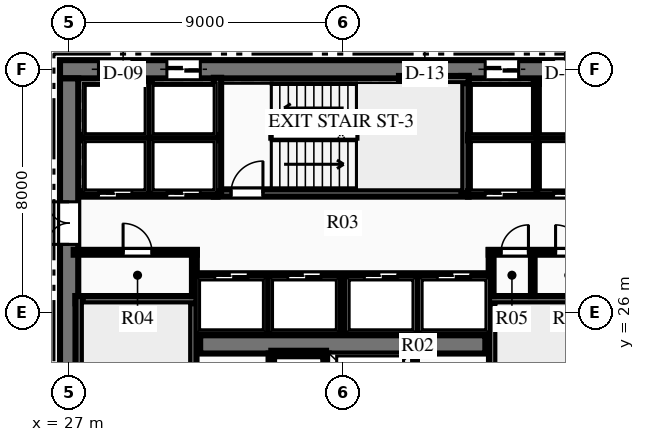
"""IFC4 building model, lengths in metres.
Left out: names, types, materials, properties, quantities, classifications, styles, units other than length and angle.
Written with IfcOpenShell. Run it as: python <this file> out.ifc"""

import sys

from ifc_helpers import new_model, si_unit, direction, frame, frame_2d, origin, place, context, subcontext, project, spatial, rectangle, extrude, element, fill, save


model = new_model("IFC4")
c1 = context("Model", 3, precision=1e-05, world=origin(), true_north=direction((0.0, 1.0)))
c2 = subcontext(c1, "Body", "Model", "MODEL_VIEW")
j1 = project(units=[si_unit("LENGTHUNIT", "METRE"), si_unit("PLANEANGLEUNIT", "RADIAN")], contexts=[c1])
p1 = place(None, origin())
s1 = spatial("IfcSite", under=j1, at=p1, CompositionType="ELEMENT")
p2 = place(p1, origin())
s2 = spatial("IfcBuilding", under=s1, at=p2, CompositionType="ELEMENT")
p3 = place(p2, frame((0.0, 0.0, 58.95)))
s3 = spatial("IfcBuildingStorey", under=s2, at=p3, CompositionType="ELEMENT", Elevation=58.95)
p4 = place(p3, frame((26.7, 34.0, 0.0), z_axis=(0.0, 0.0, 1.0), x_axis=(1.0, 0.0, 0.0)))
e1 = element("IfcWall", 1, at=p4, inside=s3, PredefinedType="SHEAR", context=c2, shape_type="SweptSolid", body=[
    extrude(rectangle(XDim=18.6, YDim=0.6, at=frame_2d((9.3, 0.0))), origin(), (0.0, 0.0, 1.0), 3.75),
])
p5 = place(p4, frame((1.265, 0.0, 0.0)))
e2 = element("IfcOpeningElement", 2, at=p5, cuts=e1, PredefinedType="OPENING", context=c2, shape_type="SweptSolid", body=[
    extrude(rectangle(XDim=1.1, YDim=2.15, at=frame_2d((0.55, 1.075))), frame((0.0, 0.31, 0.0), z_axis=(0.0, -1.0, 0.0), x_axis=(1.0, 0.0, 0.0)), (0.0, 0.0, 1.0), 0.62),
])
p6 = place(p4, frame((3.515, 0.0, 0.0)))
e3 = element("IfcOpeningElement", 3, at=p6, cuts=e1, PredefinedType="OPENING", context=c2, shape_type="SweptSolid", body=[
    extrude(rectangle(XDim=1.1, YDim=2.15, at=frame_2d((0.55, 1.075))), frame((0.0, 0.31, 0.0), z_axis=(0.0, -1.0, 0.0), x_axis=(1.0, 0.0, 0.0)), (0.0, 0.0, 1.0), 0.62),
])
p7 = place(p4, frame((13.985, 0.0, 0.0)))
e4 = element("IfcOpeningElement", 4, at=p7, cuts=e1, PredefinedType="OPENING", context=c2, shape_type="SweptSolid", body=[
    extrude(rectangle(XDim=1.1, YDim=2.15, at=frame_2d((0.55, 1.075))), frame((0.0, 0.31, 0.0), z_axis=(0.0, -1.0, 0.0), x_axis=(1.0, 0.0, 0.0)), (0.0, 0.0, 1.0), 0.62),
])
p8 = place(p4, frame((16.235, 0.0, 0.0)))
e5 = element("IfcOpeningElement", 5, at=p8, cuts=e1, PredefinedType="OPENING", context=c2, shape_type="SweptSolid", body=[
    extrude(rectangle(XDim=1.1, YDim=2.15, at=frame_2d((0.55, 1.075))), frame((0.0, 0.31, 0.0), z_axis=(0.0, -1.0, 0.0), x_axis=(1.0, 0.0, 0.0)), (0.0, 0.0, 1.0), 0.62),
])
p9 = place(p3, frame((27.0, 18.3, 0.0), z_axis=(0.0, 0.0, 1.0), x_axis=(0.0, 1.0, 0.0)))
e6 = element("IfcWall", 6, at=p9, inside=s3, PredefinedType="SHEAR", context=c2, shape_type="SweptSolid", body=[
    extrude(rectangle(XDim=15.4, YDim=0.6, at=frame_2d((7.7, 0.0))), origin(), (0.0, 0.0, 1.0), 3.75),
])
p10 = place(p9, frame((9.94, 0.0, 0.0)))
e7 = element("IfcOpeningElement", 7, at=p10, cuts=e6, PredefinedType="OPENING", context=c2, shape_type="SweptSolid", body=[
    extrude(rectangle(XDim=1.4, YDim=2.2, at=frame_2d((0.7, 1.1))), frame((0.0, 0.31, 0.0), z_axis=(0.0, -1.0, 0.0), x_axis=(1.0, 0.0, 0.0)), (0.0, 0.0, 1.0), 0.62),
])
p11 = place(p3, frame((31.31, 24.95, 0.0), z_axis=(0.0, 0.0, 1.0), x_axis=(1.0, 0.0, 0.0)))
e8 = element("IfcWall", 8, at=p11, inside=s3, PredefinedType="SHEAR", context=c2, shape_type="SweptSolid", body=[
    extrude(rectangle(XDim=9.38, YDim=0.6, at=frame_2d((4.69, 0.0))), origin(), (0.0, 0.0, 1.0), 3.75),
])
p12 = place(p3, frame((31.07, 18.28, 0.0), z_axis=(0.0, 0.0, 1.0), x_axis=(0.0, 1.0, 0.0)))
e9 = element("IfcWall", 9, at=p12, inside=s3, PredefinedType="SHEAR", context=c2, shape_type="SweptSolid", body=[
    extrude(rectangle(XDim=8.26, YDim=0.24, at=frame_2d((4.13, 0.0))), origin(), (0.0, 0.0, 1.0), 3.75),
])
p13 = place(p12, frame((0.365, 0.0, 0.0)))
e10 = element("IfcOpeningElement", 10, at=p13, cuts=e9, PredefinedType="OPENING", context=c2, shape_type="SweptSolid", body=[
    extrude(rectangle(XDim=1.05, YDim=2.15, at=frame_2d((0.525, 1.075))), frame((0.0, 0.13, 0.0), z_axis=(0.0, -1.0, 0.0), x_axis=(1.0, 0.0, 0.0)), (0.0, 0.0, 1.0), 0.26),
])
p14 = place(p3, frame((27.21, 26.42, 0.0), z_axis=(0.0, 0.0, 1.0), x_axis=(1.0, 0.0, 0.0)))
e11 = element("IfcWall", 11, at=p14, inside=s3, PredefinedType="SHEAR", context=c2, shape_type="SweptSolid", body=[
    extrude(rectangle(XDim=3.98, YDim=0.24, at=frame_2d((1.99, 0.0))), origin(), (0.0, 0.0, 1.0), 3.75),
])
p15 = place(p3, frame((27.33, 18.28, 0.0), z_axis=(0.0, 0.0, 1.0), x_axis=(0.0, 1.0, 0.0)))
e12 = element("IfcWall", 12, at=p15, inside=s3, PredefinedType="SHEAR", context=c2, shape_type="SweptSolid", body=[
    extrude(rectangle(XDim=8.26, YDim=0.24, at=frame_2d((4.13, 0.0))), origin(), (0.0, 0.0, 1.0), 3.75),
])
p16 = place(p3, frame((40.93, 18.28, 0.0), z_axis=(0.0, 0.0, 1.0), x_axis=(0.0, 1.0, 0.0)))
e13 = element("IfcWall", 13, at=p16, inside=s3, PredefinedType="SHEAR", context=c2, shape_type="SweptSolid", body=[
    extrude(rectangle(XDim=8.26, YDim=0.24, at=frame_2d((4.13, 0.0))), origin(), (0.0, 0.0, 1.0), 3.75),
])
p17 = place(p16, frame((0.365, 0.0, 0.0)))
e14 = element("IfcOpeningElement", 14, at=p17, cuts=e13, PredefinedType="OPENING", context=c2, shape_type="SweptSolid", body=[
    extrude(rectangle(XDim=1.05, YDim=2.15, at=frame_2d((0.525, 1.075))), frame((0.0, 0.13, 0.0), z_axis=(0.0, -1.0, 0.0), x_axis=(1.0, 0.0, 0.0)), (0.0, 0.0, 1.0), 0.26),
])
p18 = place(p3, frame((40.81, 26.42, 0.0), z_axis=(0.0, 0.0, 1.0), x_axis=(1.0, 0.0, 0.0)))
e15 = element("IfcWall", 15, at=p18, inside=s3, PredefinedType="SHEAR", context=c2, shape_type="SweptSolid", body=[
    extrude(rectangle(XDim=3.98, YDim=0.24, at=frame_2d((1.99, 0.0))), origin(), (0.0, 0.0, 1.0), 3.75),
])
p19 = place(p3, frame((31.76, 29.93, 0.0), z_axis=(0.0, 0.0, 1.0), x_axis=(1.0, 0.0, 0.0)))
e16 = element("IfcWall", 16, at=p19, inside=s3, PredefinedType="SHEAR", context=c2, shape_type="SweptSolid", body=[
    extrude(rectangle(XDim=8.38, YDim=0.24, at=frame_2d((4.19, 0.0))), origin(), (0.0, 0.0, 1.0), 3.75),
])
p20 = place(p19, frame((0.565, 0.0, 0.0)))
e17 = element("IfcOpeningElement", 17, at=p20, cuts=e16, PredefinedType="OPENING", context=c2, shape_type="SweptSolid", body=[
    extrude(rectangle(XDim=1.05, YDim=2.15, at=frame_2d((0.525, 1.075))), frame((0.0, 0.13, 0.0), z_axis=(0.0, -1.0, 0.0), x_axis=(1.0, 0.0, 0.0)), (0.0, 0.0, 1.0), 0.26),
])
p21 = place(p3, frame((31.88, 29.93, 0.0), z_axis=(0.0, 0.0, 1.0), x_axis=(0.0, 1.0, 0.0)))
e18 = element("IfcWall", 18, at=p21, inside=s3, PredefinedType="SHEAR", context=c2, shape_type="SweptSolid", body=[
    extrude(rectangle(XDim=3.79, YDim=0.24, at=frame_2d((1.895, 0.0))), origin(), (0.0, 0.0, 1.0), 3.75),
])
p22 = place(p3, frame((40.02, 29.93, 0.0), z_axis=(0.0, 0.0, 1.0), x_axis=(0.0, 1.0, 0.0)))
e19 = element("IfcWall", 19, at=p22, inside=s3, PredefinedType="SHEAR", context=c2, shape_type="SweptSolid", body=[
    extrude(rectangle(XDim=3.85, YDim=0.24, at=frame_2d((1.925, 0.0))), origin(), (0.0, 0.0, 1.0), 3.75),
])
p23 = place(p3, frame((37.85, 33.66, 0.0), z_axis=(0.0, 0.0, 1.0), x_axis=(1.0, 0.0, 0.0)))
e20 = element("IfcWall", 20, at=p23, inside=s3, PredefinedType="SHEAR", context=c2, shape_type="SweptSolid", body=[
    extrude(rectangle(XDim=2.29, YDim=0.24, at=frame_2d((1.145, 0.0))), origin(), (0.0, 0.0, 1.0), 3.75),
])
for number, where, z_axis, x_axis in (
    (21, (33.65, 22.05, 0.0), (0.0, 0.0, 1.0), (0.0, 1.0, 0.0)),
    (22, (35.45, 22.05, 0.0), (0.0, 0.0, 1.0), (0.0, 1.0, 0.0)),
):
    element("IfcWall", number, at=place(p3, frame(where, z_axis=z_axis, x_axis=x_axis)), inside=s3, PredefinedType="PARTITIONING", context=c2, shape_type="SweptSolid", body=[
        extrude(rectangle(XDim=2.6, YDim=0.18, at=frame_2d((1.3, 0.0))), origin(), (0.0, 0.0, 1.0), 3.44),
    ])
p24 = place(p3, frame((33.65, 24.65, 0.0), z_axis=(0.0, 0.0, 1.0), x_axis=(1.0, 0.0, 0.0)))
e23 = element("IfcWall", 23, at=p24, inside=s3, PredefinedType="PARTITIONING", context=c2, shape_type="SweptSolid", body=[
    extrude(rectangle(XDim=1.8, YDim=0.18, at=frame_2d((0.9, 0.0))), origin(), (0.0, 0.0, 1.0), 3.44),
])
p25 = place(p3, frame((38.35, 22.05, 0.0), z_axis=(0.0, 0.0, 1.0), x_axis=(0.0, 1.0, 0.0)))
e24 = element("IfcWall", 24, at=p25, inside=s3, PredefinedType="PARTITIONING", context=c2, shape_type="SweptSolid", body=[
    extrude(rectangle(XDim=2.6, YDim=0.18, at=frame_2d((1.3, 0.0))), origin(), (0.0, 0.0, 1.0), 3.44),
])
p26 = place(p3, frame((27.15, 27.98, 0.0), z_axis=(0.0, 0.0, 1.0), x_axis=(1.0, 0.0, 0.0)))
e25 = element("IfcWall", 25, at=p26, inside=s3, PredefinedType="PARTITIONING", context=c2, shape_type="SweptSolid", body=[
    extrude(rectangle(XDim=4.05, YDim=0.16, at=frame_2d((2.025, 0.0))), origin(), (0.0, 0.0, 1.0), 3.44),
])
p27 = place(p26, frame((1.625, 0.0, 0.0)))
e26 = element("IfcOpeningElement", 26, at=p27, cuts=e25, PredefinedType="OPENING", context=c2, shape_type="SweptSolid", body=[
    extrude(rectangle(XDim=0.95, YDim=2.15, at=frame_2d((0.475, 1.075))), frame((0.0, 0.09, 0.0), z_axis=(0.0, -1.0, 0.0), x_axis=(1.0, 0.0, 0.0)), (0.0, 0.0, 1.0), 0.18),
])
p28 = place(p3, frame((31.12, 26.54, 0.0), z_axis=(0.0, 0.0, 1.0), x_axis=(0.0, 1.0, 0.0)))
e27 = element("IfcWall", 27, at=p28, inside=s3, PredefinedType="PARTITIONING", context=c2, shape_type="SweptSolid", body=[
    extrude(rectangle(XDim=1.51, YDim=0.16, at=frame_2d((0.755, 0.0))), origin(), (0.0, 0.0, 1.0), 3.44),
])
p29 = place(p3, frame((40.8, 27.98, 0.0), z_axis=(0.0, 0.0, 1.0), x_axis=(1.0, 0.0, 0.0)))
e28 = element("IfcWall", 28, at=p29, inside=s3, PredefinedType="PARTITIONING", context=c2, shape_type="SweptSolid", body=[
    extrude(rectangle(XDim=4.05, YDim=0.16, at=frame_2d((2.025, 0.0))), origin(), (0.0, 0.0, 1.0), 3.44),
])
p30 = place(p29, frame((0.407, 0.0, 0.0)))
e29 = element("IfcOpeningElement", 29, at=p30, cuts=e28, PredefinedType="OPENING", context=c2, shape_type="SweptSolid", body=[
    extrude(rectangle(XDim=0.9, YDim=2.15, at=frame_2d((0.45, 1.075))), frame((0.0, 0.09, 0.0), z_axis=(0.0, -1.0, 0.0), x_axis=(1.0, 0.0, 0.0)), (0.0, 0.0, 1.0), 0.18),
])
p31 = place(p29, frame((2.2, 0.0, 0.0)))
e30 = element("IfcOpeningElement", 30, at=p31, cuts=e28, PredefinedType="OPENING", context=c2, shape_type="SweptSolid", body=[
    extrude(rectangle(XDim=0.9, YDim=2.15, at=frame_2d((0.45, 1.075))), frame((0.0, 0.09, 0.0), z_axis=(0.0, -1.0, 0.0), x_axis=(1.0, 0.0, 0.0)), (0.0, 0.0, 1.0), 0.18),
])
p32 = place(p3, frame((40.88, 26.54, 0.0), z_axis=(0.0, 0.0, 1.0), x_axis=(0.0, 1.0, 0.0)))
e31 = element("IfcWall", 31, at=p32, inside=s3, PredefinedType="PARTITIONING", context=c2, shape_type="SweptSolid", body=[
    extrude(rectangle(XDim=1.51, YDim=0.16, at=frame_2d((0.755, 0.0))), origin(), (0.0, 0.0, 1.0), 3.44),
])
p33 = place(p3, frame((42.25, 26.54, 0.0), z_axis=(0.0, 0.0, 1.0), x_axis=(0.0, 1.0, 0.0)))
e32 = element("IfcWall", 32, at=p33, inside=s3, PredefinedType="PARTITIONING", context=c2, shape_type="SweptSolid", body=[
    extrude(rectangle(XDim=1.44, YDim=0.12, at=frame_2d((0.72, 0.0))), origin(), (0.0, 0.0, 1.0), 3.44),
])
p34 = place(p3, frame((27.45, 29.9, 0.0), z_axis=(0.0, 0.0, 1.0), x_axis=(1.0, 0.0, 0.0)))
e33 = element("IfcWall", 33, at=p34, inside=s3, PredefinedType="PARTITIONING", context=c2, shape_type="SweptSolid", body=[
    extrude(rectangle(XDim=4.43, YDim=0.18, at=frame_2d((2.215, 0.0))), origin(), (0.0, 0.0, 1.0), 3.44),
])
p35 = place(p34, frame((0.515, 0.0, 0.0)))
e34 = element("IfcOpeningElement", 34, at=p35, cuts=e33, PredefinedType="OPENING", context=c2, shape_type="SweptSolid", body=[
    extrude(rectangle(XDim=1.1, YDim=2.15, at=frame_2d((0.55, 1.075))), frame((0.0, 0.1, 0.0), z_axis=(0.0, -1.0, 0.0), x_axis=(1.0, 0.0, 0.0)), (0.0, 0.0, 1.0), 0.2),
])
p36 = place(p34, frame((2.765, 0.0, 0.0)))
e35 = element("IfcOpeningElement", 35, at=p36, cuts=e33, PredefinedType="OPENING", context=c2, shape_type="SweptSolid", body=[
    extrude(rectangle(XDim=1.1, YDim=2.15, at=frame_2d((0.55, 1.075))), frame((0.0, 0.1, 0.0), z_axis=(0.0, -1.0, 0.0), x_axis=(1.0, 0.0, 0.0)), (0.0, 0.0, 1.0), 0.2),
])
p37 = place(p3, frame((27.45, 31.75, 0.0), z_axis=(0.0, 0.0, 1.0), x_axis=(1.0, 0.0, 0.0)))
e36 = element("IfcWall", 36, at=p37, inside=s3, PredefinedType="PARTITIONING", context=c2, shape_type="SweptSolid", body=[
    extrude(rectangle(XDim=4.43, YDim=0.18, at=frame_2d((2.215, 0.0))), origin(), (0.0, 0.0, 1.0), 3.44),
])
p38 = place(p3, frame((29.63, 29.9, 0.0), z_axis=(0.0, 0.0, 1.0), x_axis=(0.0, 1.0, 0.0)))
e37 = element("IfcWall", 37, at=p38, inside=s3, PredefinedType="PARTITIONING", context=c2, shape_type="SweptSolid", body=[
    extrude(rectangle(XDim=3.75, YDim=0.18, at=frame_2d((1.875, 0.0))), origin(), (0.0, 0.0, 1.0), 3.44),
])
p39 = place(p3, frame((40.12, 29.9, 0.0), z_axis=(0.0, 0.0, 1.0), x_axis=(1.0, 0.0, 0.0)))
e38 = element("IfcWall", 38, at=p39, inside=s3, PredefinedType="PARTITIONING", context=c2, shape_type="SweptSolid", body=[
    extrude(rectangle(XDim=4.43, YDim=0.18, at=frame_2d((2.215, 0.0))), origin(), (0.0, 0.0, 1.0), 3.44),
])
p40 = place(p39, frame((0.565, 0.0, 0.0)))
e39 = element("IfcOpeningElement", 39, at=p40, cuts=e38, PredefinedType="OPENING", context=c2, shape_type="SweptSolid", body=[
    extrude(rectangle(XDim=1.1, YDim=2.15, at=frame_2d((0.55, 1.075))), frame((0.0, 0.1, 0.0), z_axis=(0.0, -1.0, 0.0), x_axis=(1.0, 0.0, 0.0)), (0.0, 0.0, 1.0), 0.2),
])
p41 = place(p39, frame((2.815, 0.0, 0.0)))
e40 = element("IfcOpeningElement", 40, at=p41, cuts=e38, PredefinedType="OPENING", context=c2, shape_type="SweptSolid", body=[
    extrude(rectangle(XDim=1.1, YDim=2.15, at=frame_2d((0.55, 1.075))), frame((0.0, 0.1, 0.0), z_axis=(0.0, -1.0, 0.0), x_axis=(1.0, 0.0, 0.0)), (0.0, 0.0, 1.0), 0.2),
])
p42 = place(p3, frame((40.12, 31.75, 0.0), z_axis=(0.0, 0.0, 1.0), x_axis=(1.0, 0.0, 0.0)))
e41 = element("IfcWall", 41, at=p42, inside=s3, PredefinedType="PARTITIONING", context=c2, shape_type="SweptSolid", body=[
    extrude(rectangle(XDim=4.43, YDim=0.18, at=frame_2d((2.215, 0.0))), origin(), (0.0, 0.0, 1.0), 3.44),
])
p43 = place(p3, frame((42.37, 29.9, 0.0), z_axis=(0.0, 0.0, 1.0), x_axis=(0.0, 1.0, 0.0)))
e42 = element("IfcWall", 42, at=p43, inside=s3, PredefinedType="PARTITIONING", context=c2, shape_type="SweptSolid", body=[
    extrude(rectangle(XDim=3.75, YDim=0.18, at=frame_2d((1.875, 0.0))), origin(), (0.0, 0.0, 1.0), 3.44),
])
p44 = place(p3, frame((31.2, 27.2, 0.0), z_axis=(0.0, 0.0, 1.0), x_axis=(1.0, 0.0, 0.0)))
e43 = element("IfcWall", 43, at=p44, inside=s3, PredefinedType="PARTITIONING", context=c2, shape_type="SweptSolid", body=[
    extrude(rectangle(XDim=9.6, YDim=0.18, at=frame_2d((4.8, 0.0))), origin(), (0.0, 0.0, 1.0), 3.44),
])
p45 = place(p44, frame((0.59, 0.0, 0.0)))
e44 = element("IfcOpeningElement", 44, at=p45, cuts=e43, PredefinedType="OPENING", context=c2, shape_type="SweptSolid", body=[
    extrude(rectangle(XDim=1.1, YDim=2.15, at=frame_2d((0.55, 1.075))), frame((0.0, 0.1, 0.0), z_axis=(0.0, -1.0, 0.0), x_axis=(1.0, 0.0, 0.0)), (0.0, 0.0, 1.0), 0.2),
])
p46 = place(p44, frame((2.99, 0.0, 0.0)))
e45 = element("IfcOpeningElement", 45, at=p46, cuts=e43, PredefinedType="OPENING", context=c2, shape_type="SweptSolid", body=[
    extrude(rectangle(XDim=1.1, YDim=2.15, at=frame_2d((0.55, 1.075))), frame((0.0, 0.1, 0.0), z_axis=(0.0, -1.0, 0.0), x_axis=(1.0, 0.0, 0.0)), (0.0, 0.0, 1.0), 0.2),
])
p47 = place(p44, frame((5.51, 0.0, 0.0)))
e46 = element("IfcOpeningElement", 46, at=p47, cuts=e43, PredefinedType="OPENING", context=c2, shape_type="SweptSolid", body=[
    extrude(rectangle(XDim=1.1, YDim=2.15, at=frame_2d((0.55, 1.075))), frame((0.0, 0.1, 0.0), z_axis=(0.0, -1.0, 0.0), x_axis=(1.0, 0.0, 0.0)), (0.0, 0.0, 1.0), 0.2),
])
p48 = place(p44, frame((7.91, 0.0, 0.0)))
e47 = element("IfcOpeningElement", 47, at=p48, cuts=e43, PredefinedType="OPENING", context=c2, shape_type="SweptSolid", body=[
    extrude(rectangle(XDim=1.1, YDim=2.15, at=frame_2d((0.55, 1.075))), frame((0.0, 0.1, 0.0), z_axis=(0.0, -1.0, 0.0), x_axis=(1.0, 0.0, 0.0)), (0.0, 0.0, 1.0), 0.2),
])
for number, where, z_axis, x_axis in (
    (48, (33.54, 25.3, 0.0), (0.0, 0.0, 1.0), (0.0, 1.0, 0.0)),
    (49, (36.0, 25.3, 0.0), (0.0, 0.0, 1.0), (0.0, 1.0, 0.0)),
    (50, (38.46, 25.3, 0.0), (0.0, 0.0, 1.0), (0.0, 1.0, 0.0)),
):
    element("IfcWall", number, at=place(p3, frame(where, z_axis=z_axis, x_axis=x_axis)), inside=s3, PredefinedType="PARTITIONING", context=c2, shape_type="SweptSolid", body=[
        extrude(rectangle(XDim=1.9, YDim=0.18, at=frame_2d((0.95, 0.0))), origin(), (0.0, 0.0, 1.0), 3.44),
    ])
p49 = place(p27, origin())
e51 = element("IfcDoor", 51, at=p49, inside=s3, OperationType="SINGLE_SWING_LEFT", PredefinedType="DOOR", context=c2, shape_type="SweptSolid", body=[
    extrude(rectangle(XDim=0.95, YDim=2.15, at=frame_2d((0.475, 1.075))), frame((0.0, 0.025, 0.0), z_axis=(0.0, -1.0, 0.0), x_axis=(1.0, 0.0, 0.0)), (0.0, 0.0, 1.0), 0.05),
])
fill(e26, e51)
p50 = place(p30, origin())
e52 = element("IfcDoor", 52, at=p50, inside=s3, OperationType="SINGLE_SWING_RIGHT", PredefinedType="DOOR", context=c2, shape_type="SweptSolid", body=[
    extrude(rectangle(XDim=0.9, YDim=2.15, at=frame_2d((0.45, 1.075))), frame((0.0, 0.025, 0.0), z_axis=(0.0, -1.0, 0.0), x_axis=(1.0, 0.0, 0.0)), (0.0, 0.0, 1.0), 0.05),
])
fill(e29, e52)
p51 = place(p31, origin())
e53 = element("IfcDoor", 53, at=p51, inside=s3, OperationType="SINGLE_SWING_LEFT", PredefinedType="DOOR", context=c2, shape_type="SweptSolid", body=[
    extrude(rectangle(XDim=0.9, YDim=2.15, at=frame_2d((0.45, 1.075))), frame((0.0, 0.025, 0.0), z_axis=(0.0, -1.0, 0.0), x_axis=(1.0, 0.0, 0.0)), (0.0, 0.0, 1.0), 0.05),
])
fill(e30, e53)
p52 = place(p20, origin())
e54 = element("IfcDoor", 54, at=p52, inside=s3, OperationType="SINGLE_SWING_RIGHT", PredefinedType="DOOR", context=c2, shape_type="SweptSolid", body=[
    extrude(rectangle(XDim=1.05, YDim=2.15, at=frame_2d((0.525, 1.075))), frame((0.0, 0.025, 0.0), z_axis=(0.0, -1.0, 0.0), x_axis=(1.0, 0.0, 0.0)), (0.0, 0.0, 1.0), 0.05),
])
fill(e17, e54)
p53 = place(p10, origin())
e55 = element("IfcDoor", 55, at=p53, inside=s3, OperationType="DOUBLE_DOOR_SINGLE_SWING", PredefinedType="DOOR", context=c2, shape_type="SweptSolid", body=[
    extrude(rectangle(XDim=1.4, YDim=2.2, at=frame_2d((0.7, 1.1))), frame((0.0, 0.025, 0.0), z_axis=(0.0, -1.0, 0.0), x_axis=(1.0, 0.0, 0.0)), (0.0, 0.0, 1.0), 0.05),
])
fill(e7, e55)
p54 = place(p35, origin())
e56 = element("IfcDoor", 56, at=p54, inside=s3, OperationType="SLIDING_TO_LEFT", PredefinedType="DOOR", context=c2, shape_type="SweptSolid", body=[
    extrude(rectangle(XDim=1.1, YDim=2.15, at=frame_2d((0.55, 1.075))), frame((0.0, 0.025, 0.0), z_axis=(0.0, -1.0, 0.0), x_axis=(1.0, 0.0, 0.0)), (0.0, 0.0, 1.0), 0.05),
])
fill(e34, e56)
p55 = place(p36, origin())
e57 = element("IfcDoor", 57, at=p55, inside=s3, OperationType="SLIDING_TO_LEFT", PredefinedType="DOOR", context=c2, shape_type="SweptSolid", body=[
    extrude(rectangle(XDim=1.1, YDim=2.15, at=frame_2d((0.55, 1.075))), frame((0.0, 0.025, 0.0), z_axis=(0.0, -1.0, 0.0), x_axis=(1.0, 0.0, 0.0)), (0.0, 0.0, 1.0), 0.05),
])
fill(e35, e57)
p56 = place(p5, origin())
e58 = element("IfcDoor", 58, at=p56, inside=s3, OperationType="SLIDING_TO_LEFT", PredefinedType="DOOR", context=c2, shape_type="SweptSolid", body=[
    extrude(rectangle(XDim=1.1, YDim=2.15, at=frame_2d((0.55, 1.075))), frame((0.0, 0.025, 0.0), z_axis=(0.0, -1.0, 0.0), x_axis=(1.0, 0.0, 0.0)), (0.0, 0.0, 1.0), 0.05),
])
fill(e2, e58)
p57 = place(p6, origin())
e59 = element("IfcDoor", 59, at=p57, inside=s3, OperationType="SLIDING_TO_LEFT", PredefinedType="DOOR", context=c2, shape_type="SweptSolid", body=[
    extrude(rectangle(XDim=1.1, YDim=2.15, at=frame_2d((0.55, 1.075))), frame((0.0, 0.025, 0.0), z_axis=(0.0, -1.0, 0.0), x_axis=(1.0, 0.0, 0.0)), (0.0, 0.0, 1.0), 0.05),
])
fill(e3, e59)
p58 = place(p40, origin())
e60 = element("IfcDoor", 60, at=p58, inside=s3, OperationType="SLIDING_TO_LEFT", PredefinedType="DOOR", context=c2, shape_type="SweptSolid", body=[
    extrude(rectangle(XDim=1.1, YDim=2.15, at=frame_2d((0.55, 1.075))), frame((0.0, 0.025, 0.0), z_axis=(0.0, -1.0, 0.0), x_axis=(1.0, 0.0, 0.0)), (0.0, 0.0, 1.0), 0.05),
])
fill(e39, e60)
p59 = place(p41, origin())
e61 = element("IfcDoor", 61, at=p59, inside=s3, OperationType="SLIDING_TO_LEFT", PredefinedType="DOOR", context=c2, shape_type="SweptSolid", body=[
    extrude(rectangle(XDim=1.1, YDim=2.15, at=frame_2d((0.55, 1.075))), frame((0.0, 0.025, 0.0), z_axis=(0.0, -1.0, 0.0), x_axis=(1.0, 0.0, 0.0)), (0.0, 0.0, 1.0), 0.05),
])
fill(e40, e61)
p60 = place(p7, origin())
e62 = element("IfcDoor", 62, at=p60, inside=s3, OperationType="SLIDING_TO_LEFT", PredefinedType="DOOR", context=c2, shape_type="SweptSolid", body=[
    extrude(rectangle(XDim=1.1, YDim=2.15, at=frame_2d((0.55, 1.075))), frame((0.0, 0.025, 0.0), z_axis=(0.0, -1.0, 0.0), x_axis=(1.0, 0.0, 0.0)), (0.0, 0.0, 1.0), 0.05),
])
fill(e4, e62)
p61 = place(p8, origin())
e63 = element("IfcDoor", 63, at=p61, inside=s3, OperationType="SLIDING_TO_LEFT", PredefinedType="DOOR", context=c2, shape_type="SweptSolid", body=[
    extrude(rectangle(XDim=1.1, YDim=2.15, at=frame_2d((0.55, 1.075))), frame((0.0, 0.025, 0.0), z_axis=(0.0, -1.0, 0.0), x_axis=(1.0, 0.0, 0.0)), (0.0, 0.0, 1.0), 0.05),
])
fill(e5, e63)
p62 = place(p45, origin())
e64 = element("IfcDoor", 64, at=p62, inside=s3, OperationType="SLIDING_TO_LEFT", PredefinedType="DOOR", context=c2, shape_type="SweptSolid", body=[
    extrude(rectangle(XDim=1.1, YDim=2.15, at=frame_2d((0.55, 1.075))), frame((0.0, 0.025, 0.0), z_axis=(0.0, -1.0, 0.0), x_axis=(1.0, 0.0, 0.0)), (0.0, 0.0, 1.0), 0.05),
])
fill(e44, e64)
p63 = place(p46, origin())
e65 = element("IfcDoor", 65, at=p63, inside=s3, OperationType="SLIDING_TO_LEFT", PredefinedType="DOOR", context=c2, shape_type="SweptSolid", body=[
    extrude(rectangle(XDim=1.1, YDim=2.15, at=frame_2d((0.55, 1.075))), frame((0.0, 0.025, 0.0), z_axis=(0.0, -1.0, 0.0), x_axis=(1.0, 0.0, 0.0)), (0.0, 0.0, 1.0), 0.05),
])
fill(e45, e65)
p64 = place(p47, origin())
e66 = element("IfcDoor", 66, at=p64, inside=s3, OperationType="SLIDING_TO_LEFT", PredefinedType="DOOR", context=c2, shape_type="SweptSolid", body=[
    extrude(rectangle(XDim=1.1, YDim=2.15, at=frame_2d((0.55, 1.075))), frame((0.0, 0.025, 0.0), z_axis=(0.0, -1.0, 0.0), x_axis=(1.0, 0.0, 0.0)), (0.0, 0.0, 1.0), 0.05),
])
fill(e46, e66)
p65 = place(p48, origin())
e67 = element("IfcDoor", 67, at=p65, inside=s3, OperationType="SLIDING_TO_LEFT", PredefinedType="DOOR", context=c2, shape_type="SweptSolid", body=[
    extrude(rectangle(XDim=1.1, YDim=2.15, at=frame_2d((0.55, 1.075))), frame((0.0, 0.025, 0.0), z_axis=(0.0, -1.0, 0.0), x_axis=(1.0, 0.0, 0.0)), (0.0, 0.0, 1.0), 0.05),
])
fill(e47, e67)
save(model, sys.argv[1])
